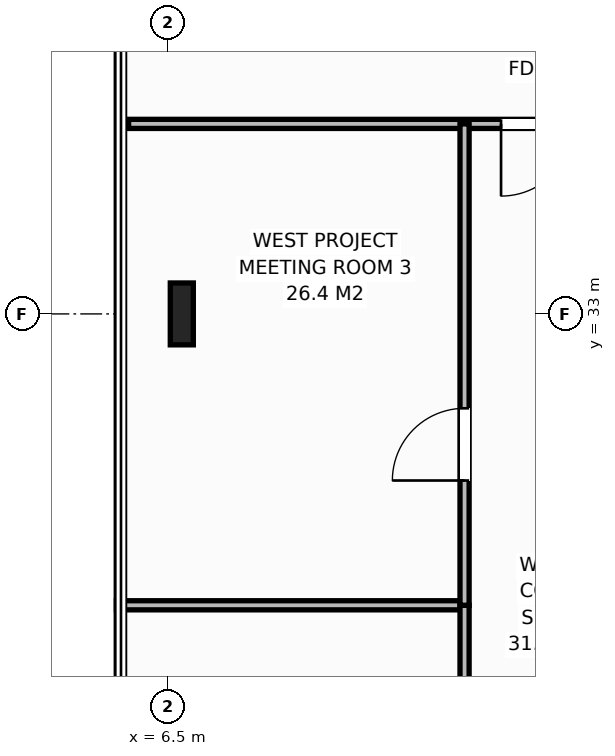
"""IFC4 building model, lengths in metres.
Left out: names, types, materials, properties, quantities, classifications, styles, units other than length and angle.
Written with IfcOpenShell. Run it as: python <this file> out.ifc"""

import sys

from ifc_helpers import new_model, si_unit, direction, frame, frame_2d, origin, origin_2d, place, context, subcontext, project, spatial, rectangle, i_section, extrude, element, fill, save


model = new_model("IFC4")
c1 = context("Model", 3, precision=1e-05, world=origin(), true_north=direction((0.0, 1.0)))
c2 = subcontext(c1, "Body", "Model", "MODEL_VIEW")
j1 = project(units=[si_unit("LENGTHUNIT", "METRE"), si_unit("PLANEANGLEUNIT", "RADIAN")], contexts=[c1])
p1 = place(None, origin())
s1 = spatial("IfcSite", under=j1, at=p1, CompositionType="ELEMENT")
p2 = place(p1, origin())
s2 = spatial("IfcBuilding", under=s1, at=p2, CompositionType="ELEMENT")
p3 = place(p2, frame((0.0, 0.0, 232.8)))
s3 = spatial("IfcBuildingStorey", under=s2, at=p3, CompositionType="ELEMENT", Elevation=232.8)
p4 = place(p3, frame((6.68, 33.0, 0.0), z_axis=(0.0, 0.0, 1.0), x_axis=(1.0, 0.0, 0.0)))
e1 = element("IfcColumn", 1, at=p4, inside=s3, PredefinedType="COLUMN", context=c2, shape_type="SweptSolid", body=[
    extrude(i_section(OverallWidth=0.303, OverallDepth=0.814, WebThickness=0.021, FlangeThickness=0.04, at=origin_2d()), origin(), (0.0, 0.0, 1.0), 3.8),
])
p5 = place(p3, frame((5.98, 35.5, 0.0), z_axis=(0.0, 0.0, 1.0), x_axis=(1.0, 0.0, 0.0)))
e2 = element("IfcWall", 2, at=p5, inside=s3, PredefinedType="PARTITIONING", context=c2, shape_type="SweptSolid", body=[
    extrude(rectangle(XDim=7.16, YDim=0.12, at=frame_2d((3.58, 0.0))), origin(), (0.0, 0.0, 1.0), 3.58),
])
p6 = place(p5, frame((4.9, 0.0, 0.0)))
e3 = element("IfcOpeningElement", 3, at=p6, cuts=e2, PredefinedType="OPENING", context=c2, shape_type="SweptSolid", body=[
    extrude(rectangle(XDim=0.95, YDim=2.15, at=frame_2d((0.475, 1.075))), frame((0.0, 0.07, 0.0), z_axis=(0.0, -1.0, 0.0), x_axis=(1.0, 0.0, 0.0)), (0.0, 0.0, 1.0), 0.14),
])
p7 = place(p3, frame((5.82, 29.167, 0.0), z_axis=(0.0, 0.0, 1.0), x_axis=(1.0, 0.0, 0.0)))
e4 = element("IfcWall", 4, at=p7, inside=s3, PredefinedType="PARTITIONING", context=c2, shape_type="SweptSolid", body=[
    extrude(rectangle(XDim=4.58, YDim=0.12, at=frame_2d((2.29, 0.0))), origin(), (0.0, 0.0, 1.0), 3.58),
])
p8 = place(p3, frame((10.4, 22.833, 0.0), z_axis=(0.0, 0.0, 1.0), x_axis=(0.0, 1.0, 0.0)))
e5 = element("IfcWall", 5, at=p8, inside=s3, PredefinedType="PARTITIONING", context=c2, shape_type="SweptSolid", body=[
    extrude(rectangle(XDim=6.333, YDim=0.12, at=frame_2d((3.167, 0.0))), origin(), (0.0, 0.0, 1.0), 3.58),
])
p9 = place(p8, frame((2.692, 0.0, 0.0)))
e6 = element("IfcOpeningElement", 6, at=p9, cuts=e5, PredefinedType="OPENING", context=c2, shape_type="SweptSolid", body=[
    extrude(rectangle(XDim=0.95, YDim=2.15, at=frame_2d((0.475, 1.075))), frame((0.0, 0.07, 0.0), z_axis=(0.0, -1.0, 0.0), x_axis=(1.0, 0.0, 0.0)), (0.0, 0.0, 1.0), 0.14),
])
p10 = place(p3, frame((10.4, 29.167, 0.0), z_axis=(0.0, 0.0, 1.0), x_axis=(0.0, 1.0, 0.0)))
e7 = element("IfcWall", 7, at=p10, inside=s3, PredefinedType="PARTITIONING", context=c2, shape_type="SweptSolid", body=[
    extrude(rectangle(XDim=6.333, YDim=0.12, at=frame_2d((3.167, 0.0))), origin(), (0.0, 0.0, 1.0), 3.58),
])
p11 = place(p10, frame((1.642, 0.0, 0.0)))
e8 = element("IfcOpeningElement", 8, at=p11, cuts=e7, PredefinedType="OPENING", context=c2, shape_type="SweptSolid", body=[
    extrude(rectangle(XDim=0.95, YDim=2.15, at=frame_2d((0.475, 1.075))), frame((0.0, 0.07, 0.0), z_axis=(0.0, -1.0, 0.0), x_axis=(1.0, 0.0, 0.0)), (0.0, 0.0, 1.0), 0.14),
])
p12 = place(p6, origin())
e9 = element("IfcDoor", 9, at=p12, inside=s3, OperationType="SINGLE_SWING_RIGHT", PredefinedType="DOOR", context=c2, shape_type="SweptSolid", body=[
    extrude(rectangle(XDim=0.95, YDim=2.15, at=frame_2d((0.475, 1.075))), frame((0.0, 0.025, 0.0), z_axis=(0.0, -1.0, 0.0), x_axis=(1.0, 0.0, 0.0)), (0.0, 0.0, 1.0), 0.05),
])
fill(e3, e9)
p13 = place(p11, origin())
e10 = element("IfcDoor", 10, at=p13, inside=s3, OperationType="SINGLE_SWING_LEFT", PredefinedType="DOOR", context=c2, shape_type="SweptSolid", body=[
    extrude(rectangle(XDim=0.95, YDim=2.15, at=frame_2d((0.475, 1.075))), frame((0.0, 0.025, 0.0), z_axis=(0.0, -1.0, 0.0), x_axis=(1.0, 0.0, 0.0)), (0.0, 0.0, 1.0), 0.05),
])
fill(e8, e10)
save(model, sys.argv[1])
